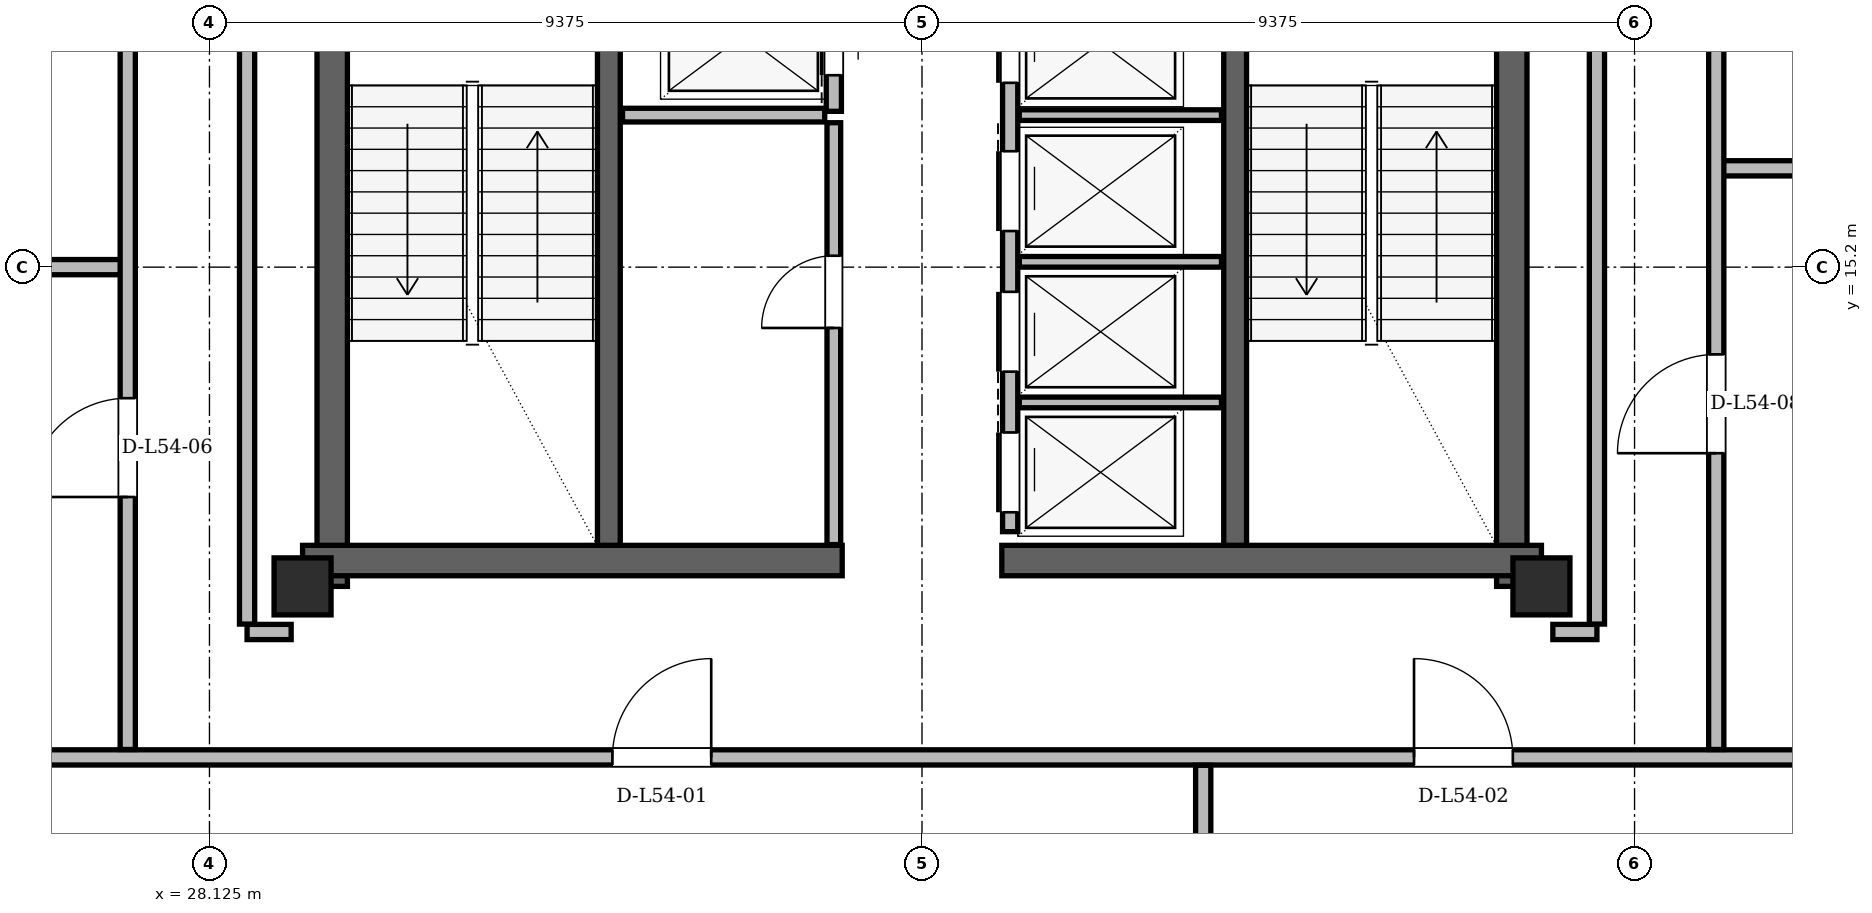
"""IFC4 building model, lengths in metres.
Left out: names, types, materials, properties, quantities, classifications, styles, units other than length and angle.
Written with IfcOpenShell. Run it as: python <this file> out.ifc"""

import sys

from ifc_helpers import new_model, si_unit, direction, frame, frame_2d, origin, origin_2d, place, context, subcontext, project, spatial, rectangle, hollow_rectangle, extrude, element, fill, save


model = new_model("IFC4")
c1 = context("Model", 3, precision=1e-05, world=origin(), true_north=direction((0.0, 1.0)))
c2 = subcontext(c1, "Body", "Model", "MODEL_VIEW")
j1 = project(units=[si_unit("LENGTHUNIT", "METRE"), si_unit("PLANEANGLEUNIT", "RADIAN")], contexts=[c1])
p1 = place(None, origin())
s1 = spatial("IfcSite", under=j1, at=p1, CompositionType="ELEMENT")
p2 = place(p1, origin())
s2 = spatial("IfcBuilding", under=s1, at=p2, CompositionType="ELEMENT")
p3 = place(p2, frame((0.0, 0.0, 204.6)))
s3 = spatial("IfcBuildingStorey", under=s2, at=p3, CompositionType="ELEMENT", Elevation=204.6)
for number, where, z_axis, x_axis in (
    (1, (29.35, 11.0, 0.0), (0.0, 0.0, 1.0), (1.0, 0.0, 0.0)),
    (2, (45.65, 11.0, 0.0), (0.0, 0.0, 1.0), (1.0, 0.0, 0.0)),
):
    element("IfcColumn", number, at=place(p3, frame(where, z_axis=z_axis, x_axis=x_axis)), inside=s3, PredefinedType="COLUMN", context=c2, shape_type="SweptSolid", body=[
        extrude(hollow_rectangle(XDim=0.75, YDim=0.75, WallThickness=0.06, at=origin_2d()), origin(), (0.0, 0.0, 1.0), 4.5),
    ])
for number, where, z_axis, x_axis in (
    (3, (29.74, 11.0, 0.0), (0.0, 0.0, 1.0), (0.0, 1.0, 0.0)),
    (4, (45.26, 11.0, 0.0), (0.0, 0.0, 1.0), (0.0, 1.0, 0.0)),
):
    element("IfcWall", number, at=place(p3, frame(where, z_axis=z_axis, x_axis=x_axis)), inside=s3, PredefinedType="SHEAR", context=c2, shape_type="SweptSolid", body=[
        extrude(rectangle(XDim=13.3, YDim=0.4, at=frame_2d((6.65, 0.0))), origin(), (0.0, 0.0, 1.0), 4.28),
    ])
for number, where, z_axis, x_axis in (
    (5, (29.35, 11.34, 0.0), (0.0, 0.0, 1.0), (1.0, 0.0, 0.0)),
    (6, (38.55, 11.34, 0.0), (0.0, 0.0, 1.0), (1.0, 0.0, 0.0)),
):
    element("IfcWall", number, at=place(p3, frame(where, z_axis=z_axis, x_axis=x_axis)), inside=s3, PredefinedType="SHEAR", context=c2, shape_type="SweptSolid", body=[
        extrude(rectangle(XDim=7.1, YDim=0.4, at=frame_2d((3.55, 0.0))), origin(), (0.0, 0.0, 1.0), 4.28),
    ])
for number, where, z_axis, x_axis in (
    (7, (33.38, 11.54, 0.0), (0.0, 0.0, 1.0), (0.0, 1.0, 0.0)),
    (8, (41.62, 11.54, 0.0), (0.0, 0.0, 1.0), (0.0, 1.0, 0.0)),
):
    element("IfcWall", number, at=place(p3, frame(where, z_axis=z_axis, x_axis=x_axis)), inside=s3, PredefinedType="SHEAR", context=c2, shape_type="SweptSolid", body=[
        extrude(rectangle(XDim=7.62, YDim=0.3, at=frame_2d((3.81, 0.0))), origin(), (0.0, 0.0, 1.0), 4.28),
    ])
p4 = place(p3, frame((36.34, 17.25, 0.0), z_axis=(0.0, 0.0, 1.0), x_axis=(0.0, 1.0, 0.0)))
e9 = element("IfcWall", 9, at=p4, inside=s3, PredefinedType="PARTITIONING", context=c2, shape_type="SweptSolid", body=[
    extrude(rectangle(XDim=2.07, YDim=0.2, at=frame_2d((1.035, 0.0))), origin(), (0.0, 0.0, 1.0), 4.28),
])
p5 = place(p4, frame((0.475, 0.0, 0.0)))
e10 = element("IfcOpeningElement", 10, at=p5, cuts=e9, PredefinedType="OPENING", context=c2, shape_type="SweptSolid", body=[
    extrude(rectangle(XDim=1.05, YDim=2.15, at=frame_2d((0.525, 1.075))), frame((0.0, 0.1, 0.0), z_axis=(0.0, -1.0, 0.0), x_axis=(1.0, 0.0, 0.0)), (0.0, 0.0, 1.0), 0.2),
])
p6 = place(p3, frame((33.56, 17.2, 0.0), z_axis=(0.0, 0.0, 1.0), x_axis=(1.0, 0.0, 0.0)))
e11 = element("IfcWall", 11, at=p6, inside=s3, PredefinedType="PARTITIONING", context=c2, shape_type="SweptSolid", body=[
    extrude(rectangle(XDim=2.66, YDim=0.18, at=frame_2d((1.33, 0.0))), origin(), (0.0, 0.0, 1.0), 4.28),
])
p7 = place(p3, frame((36.34, 11.55, 0.0), z_axis=(0.0, 0.0, 1.0), x_axis=(0.0, 1.0, 0.0)))
e12 = element("IfcWall", 12, at=p7, inside=s3, PredefinedType="PARTITIONING", context=c2, shape_type="SweptSolid", body=[
    extrude(rectangle(XDim=5.55, YDim=0.18, at=frame_2d((2.775, 0.0))), origin(), (0.0, 0.0, 1.0), 4.28),
])
p8 = place(p7, frame((2.85, 0.0, 0.0)))
e13 = element("IfcOpeningElement", 13, at=p8, cuts=e12, PredefinedType="OPENING", context=c2, shape_type="SweptSolid", body=[
    extrude(rectangle(XDim=0.95, YDim=2.1, at=frame_2d((0.475, 1.05))), frame((0.0, 0.09, 0.0), z_axis=(0.0, -1.0, 0.0), x_axis=(1.0, 0.0, 0.0)), (0.0, 0.0, 1.0), 0.18),
])
p9 = place(p3, frame((38.66, 11.72, 0.0), z_axis=(0.0, 0.0, 1.0), x_axis=(0.0, 1.0, 0.0)))
e14 = element("IfcWall", 14, at=p9, inside=s3, PredefinedType="PARTITIONING", context=c2, shape_type="SweptSolid", body=[
    extrude(rectangle(XDim=9.1, YDim=0.2, at=frame_2d((4.55, 0.0))), origin(), (0.0, 0.0, 1.0), 4.28),
])
p10 = place(p9, frame((0.255, 0.0, 0.0)))
e15 = element("IfcOpeningElement", 15, at=p10, cuts=e14, PredefinedType="OPENING", context=c2, shape_type="SweptSolid", body=[
    extrude(rectangle(XDim=1.05, YDim=2.15, at=frame_2d((0.525, 1.075))), frame((0.0, 0.1, 0.0), z_axis=(0.0, -1.0, 0.0), x_axis=(1.0, 0.0, 0.0)), (0.0, 0.0, 1.0), 0.2),
])
p11 = place(p9, frame((2.105, 0.0, 0.0)))
e16 = element("IfcOpeningElement", 16, at=p11, cuts=e14, PredefinedType="OPENING", context=c2, shape_type="SweptSolid", body=[
    extrude(rectangle(XDim=1.05, YDim=2.15, at=frame_2d((0.525, 1.075))), frame((0.0, 0.1, 0.0), z_axis=(0.0, -1.0, 0.0), x_axis=(1.0, 0.0, 0.0)), (0.0, 0.0, 1.0), 0.2),
])
p12 = place(p9, frame((3.955, 0.0, 0.0)))
e17 = element("IfcOpeningElement", 17, at=p12, cuts=e14, PredefinedType="OPENING", context=c2, shape_type="SweptSolid", body=[
    extrude(rectangle(XDim=1.05, YDim=2.15, at=frame_2d((0.525, 1.075))), frame((0.0, 0.1, 0.0), z_axis=(0.0, -1.0, 0.0), x_axis=(1.0, 0.0, 0.0)), (0.0, 0.0, 1.0), 0.2),
])
p13 = place(p9, frame((5.905, 0.0, 0.0)))
e18 = element("IfcOpeningElement", 18, at=p13, cuts=e14, PredefinedType="OPENING", context=c2, shape_type="SweptSolid", body=[
    extrude(rectangle(XDim=1.05, YDim=2.15, at=frame_2d((0.525, 1.075))), frame((0.0, 0.1, 0.0), z_axis=(0.0, -1.0, 0.0), x_axis=(1.0, 0.0, 0.0)), (0.0, 0.0, 1.0), 0.2),
])
p14 = place(p9, frame((7.705, 0.0, 0.0)))
e19 = element("IfcOpeningElement", 19, at=p14, cuts=e14, PredefinedType="OPENING", context=c2, shape_type="SweptSolid", body=[
    extrude(rectangle(XDim=1.05, YDim=2.15, at=frame_2d((0.525, 1.075))), frame((0.0, 0.1, 0.0), z_axis=(0.0, -1.0, 0.0), x_axis=(1.0, 0.0, 0.0)), (0.0, 0.0, 1.0), 0.2),
])
for number, where, z_axis, x_axis in (
    (20, (38.78, 13.42, 0.0), (0.0, 0.0, 1.0), (1.0, 0.0, 0.0)),
    (21, (38.78, 15.27, 0.0), (0.0, 0.0, 1.0), (1.0, 0.0, 0.0)),
    (22, (38.78, 17.2, 0.0), (0.0, 0.0, 1.0), (1.0, 0.0, 0.0)),
):
    element("IfcWall", number, at=place(p3, frame(where, z_axis=z_axis, x_axis=x_axis)), inside=s3, PredefinedType="PARTITIONING", context=c2, shape_type="SweptSolid", body=[
        extrude(rectangle(XDim=2.66, YDim=0.14, at=frame_2d((1.33, 0.0))), origin(), (0.0, 0.0, 1.0), 4.28),
    ])
p15 = place(p3, frame((17.562, 8.75, 0.0), z_axis=(0.0, 0.0, 1.0), x_axis=(1.0, 0.0, 0.0)))
e23 = element("IfcWall", 23, at=p15, inside=s3, PredefinedType="PARTITIONING", context=c2, shape_type="SweptSolid", body=[
    extrude(rectangle(XDim=39.877, YDim=0.2, at=frame_2d((19.938, 0.0))), origin(), (0.0, 0.0, 1.0), 3.813),
])
p16 = place(p15, frame((15.865, 0.0, 0.0)))
e24 = element("IfcOpeningElement", 24, at=p16, cuts=e23, PredefinedType="OPENING", context=c2, shape_type="SweptSolid", body=[
    extrude(rectangle(XDim=1.3, YDim=2.2, at=frame_2d((0.65, 1.1))), frame((0.0, 0.1, 0.0), z_axis=(0.0, -1.0, 0.0), x_axis=(1.0, 0.0, 0.0)), (0.0, 0.0, 1.0), 0.2),
])
p17 = place(p15, frame((26.412, 0.0, 0.0)))
e25 = element("IfcOpeningElement", 25, at=p17, cuts=e23, PredefinedType="OPENING", context=c2, shape_type="SweptSolid", body=[
    extrude(rectangle(XDim=1.3, YDim=2.2, at=frame_2d((0.65, 1.1))), frame((0.0, 0.1, 0.0), z_axis=(0.0, -1.0, 0.0), x_axis=(1.0, 0.0, 0.0)), (0.0, 0.0, 1.0), 0.2),
])
for number, where, z_axis, x_axis in (
    (26, (28.62, 10.4, 0.0), (0.0, 0.0, 1.0), (1.0, 0.0, 0.0)),
    (27, (45.8, 10.4, 0.0), (0.0, 0.0, 1.0), (1.0, 0.0, 0.0)),
):
    element("IfcWall", number, at=place(p3, frame(where, z_axis=z_axis, x_axis=x_axis)), inside=s3, PredefinedType="PARTITIONING", context=c2, shape_type="SweptSolid", body=[
        extrude(rectangle(XDim=0.58, YDim=0.2, at=frame_2d((0.29, 0.0))), origin(), (0.0, 0.0, 1.0), 4.28),
    ])
p18 = place(p3, frame((17.926, 15.2, 0.0), z_axis=(0.0, 0.0, 1.0), x_axis=(1.0, 0.0, 0.0)))
e28 = element("IfcWall", 28, at=p18, inside=s3, PredefinedType="PARTITIONING", context=c2, shape_type="SweptSolid", body=[
    extrude(rectangle(XDim=9.124, YDim=0.2, at=frame_2d((4.562, 0.0))), origin(), (0.0, 0.0, 1.0), 4.28),
])
p19 = place(p3, frame((47.95, 16.5, 0.0), z_axis=(0.0, 0.0, 1.0), x_axis=(1.0, 0.0, 0.0)))
e29 = element("IfcWall", 29, at=p19, inside=s3, PredefinedType="PARTITIONING", context=c2, shape_type="SweptSolid", body=[
    extrude(rectangle(XDim=8.195, YDim=0.2, at=frame_2d((4.098, 0.0))), origin(), (0.0, 0.0, 1.0), 4.28),
])
p20 = place(p3, frame((27.05, 8.854, 0.0), z_axis=(0.0, 0.0, 1.0), x_axis=(0.0, 1.0, 0.0)))
e30 = element("IfcWall", 30, at=p20, inside=s3, PredefinedType="PARTITIONING", context=c2, shape_type="SweptSolid", body=[
    extrude(rectangle(XDim=22.218, YDim=0.2, at=frame_2d((11.109, 0.0))), origin(), (0.0, 0.0, 1.0), 3.577),
])
p21 = place(p20, frame((3.322, 0.0, 0.0)))
e31 = element("IfcOpeningElement", 31, at=p21, cuts=e30, PredefinedType="OPENING", context=c2, shape_type="SweptSolid", body=[
    extrude(rectangle(XDim=1.3, YDim=2.2, at=frame_2d((0.65, 1.1))), frame((0.0, 0.1, 0.0), z_axis=(0.0, -1.0, 0.0), x_axis=(1.0, 0.0, 0.0)), (0.0, 0.0, 1.0), 0.2),
])
p22 = place(p20, frame((10.445, 0.0, 0.0)))
e32 = element("IfcOpeningElement", 32, at=p22, cuts=e30, PredefinedType="OPENING", context=c2, shape_type="SweptSolid", body=[
    extrude(rectangle(XDim=1.3, YDim=2.2, at=frame_2d((0.65, 1.1))), frame((0.0, 0.1, 0.0), z_axis=(0.0, -1.0, 0.0), x_axis=(1.0, 0.0, 0.0)), (0.0, 0.0, 1.0), 0.2),
])
p23 = place(p3, frame((28.62, 10.504, 0.0), z_axis=(0.0, 0.0, 1.0), x_axis=(0.0, 1.0, 0.0)))
e33 = element("IfcWall", 33, at=p23, inside=s3, PredefinedType="PARTITIONING", context=c2, shape_type="SweptSolid", body=[
    extrude(rectangle(XDim=14.142, YDim=0.2, at=frame_2d((7.071, 0.0))), origin(), (0.0, 0.0, 1.0), 3.813),
])
p24 = place(p3, frame((41.2, 5.598, 0.0), z_axis=(0.0, 0.0, 1.0), x_axis=(0.0, 1.0, 0.0)))
e34 = element("IfcWall", 34, at=p24, inside=s3, PredefinedType="PARTITIONING", context=c2, shape_type="SweptSolid", body=[
    extrude(rectangle(XDim=3.048, YDim=0.2, at=frame_2d((1.524, 0.0))), origin(), (0.0, 0.0, 1.0), 4.28),
])
p25 = place(p3, frame((46.38, 10.504, 0.0), z_axis=(0.0, 0.0, 1.0), x_axis=(0.0, 1.0, 0.0)))
e35 = element("IfcWall", 35, at=p25, inside=s3, PredefinedType="PARTITIONING", context=c2, shape_type="SweptSolid", body=[
    extrude(rectangle(XDim=14.142, YDim=0.2, at=frame_2d((7.071, 0.0))), origin(), (0.0, 0.0, 1.0), 3.813),
])
p26 = place(p3, frame((47.95, 8.854, 0.0), z_axis=(0.0, 0.0, 1.0), x_axis=(0.0, 1.0, 0.0)))
e36 = element("IfcWall", 36, at=p26, inside=s3, PredefinedType="PARTITIONING", context=c2, shape_type="SweptSolid", body=[
    extrude(rectangle(XDim=21.31, YDim=0.2, at=frame_2d((10.655, 0.0))), origin(), (0.0, 0.0, 1.0), 3.813),
])
p27 = place(p26, frame((3.898, 0.0, 0.0)))
e37 = element("IfcOpeningElement", 37, at=p27, cuts=e36, PredefinedType="OPENING", context=c2, shape_type="SweptSolid", body=[
    extrude(rectangle(XDim=1.3, YDim=2.2, at=frame_2d((0.65, 1.1))), frame((0.0, 0.1, 0.0), z_axis=(0.0, -1.0, 0.0), x_axis=(1.0, 0.0, 0.0)), (0.0, 0.0, 1.0), 0.2),
])
p28 = place(p26, frame((11.02, 0.0, 0.0)))
e38 = element("IfcOpeningElement", 38, at=p28, cuts=e36, PredefinedType="OPENING", context=c2, shape_type="SweptSolid", body=[
    extrude(rectangle(XDim=1.3, YDim=2.2, at=frame_2d((0.65, 1.1))), frame((0.0, 0.1, 0.0), z_axis=(0.0, -1.0, 0.0), x_axis=(1.0, 0.0, 0.0)), (0.0, 0.0, 1.0), 0.2),
])
p29 = place(p8, origin())
e39 = element("IfcDoor", 39, at=p29, inside=s3, OperationType="SINGLE_SWING_LEFT", PredefinedType="DOOR", context=c2, shape_type="SweptSolid", body=[
    extrude(rectangle(XDim=0.95, YDim=2.1, at=frame_2d((0.475, 1.05))), frame((0.0, 0.025, 0.0), z_axis=(0.0, -1.0, 0.0), x_axis=(1.0, 0.0, 0.0)), (0.0, 0.0, 1.0), 0.05),
])
fill(e13, e39)
p30 = place(p10, origin())
e40 = element("IfcDoor", 40, at=p30, inside=s3, OperationType="SLIDING_TO_RIGHT", PredefinedType="DOOR", context=c2, shape_type="SweptSolid", body=[
    extrude(rectangle(XDim=1.05, YDim=2.15, at=frame_2d((0.525, 1.075))), frame((0.0, 0.025, 0.0), z_axis=(0.0, -1.0, 0.0), x_axis=(1.0, 0.0, 0.0)), (0.0, 0.0, 1.0), 0.05),
])
fill(e15, e40)
p31 = place(p11, origin())
e41 = element("IfcDoor", 41, at=p31, inside=s3, OperationType="SLIDING_TO_LEFT", PredefinedType="DOOR", context=c2, shape_type="SweptSolid", body=[
    extrude(rectangle(XDim=1.05, YDim=2.15, at=frame_2d((0.525, 1.075))), frame((0.0, 0.025, 0.0), z_axis=(0.0, -1.0, 0.0), x_axis=(1.0, 0.0, 0.0)), (0.0, 0.0, 1.0), 0.05),
])
fill(e16, e41)
p32 = place(p12, origin())
e42 = element("IfcDoor", 42, at=p32, inside=s3, OperationType="SLIDING_TO_RIGHT", PredefinedType="DOOR", context=c2, shape_type="SweptSolid", body=[
    extrude(rectangle(XDim=1.05, YDim=2.15, at=frame_2d((0.525, 1.075))), frame((0.0, 0.025, 0.0), z_axis=(0.0, -1.0, 0.0), x_axis=(1.0, 0.0, 0.0)), (0.0, 0.0, 1.0), 0.05),
])
fill(e17, e42)
p33 = place(p5, origin())
e43 = element("IfcDoor", 43, at=p33, inside=s3, OperationType="SLIDING_TO_LEFT", PredefinedType="DOOR", context=c2, shape_type="SweptSolid", body=[
    extrude(rectangle(XDim=1.05, YDim=2.15, at=frame_2d((0.525, 1.075))), frame((0.0, 0.025, 0.0), z_axis=(0.0, -1.0, 0.0), x_axis=(1.0, 0.0, 0.0)), (0.0, 0.0, 1.0), 0.05),
])
fill(e10, e43)
p34 = place(p13, origin())
e44 = element("IfcDoor", 44, at=p34, inside=s3, OperationType="SLIDING_TO_RIGHT", PredefinedType="DOOR", context=c2, shape_type="SweptSolid", body=[
    extrude(rectangle(XDim=1.05, YDim=2.15, at=frame_2d((0.525, 1.075))), frame((0.0, 0.025, 0.0), z_axis=(0.0, -1.0, 0.0), x_axis=(1.0, 0.0, 0.0)), (0.0, 0.0, 1.0), 0.05),
])
fill(e18, e44)
p35 = place(p16, origin())
e45 = element("IfcDoor", 45, at=p35, inside=s3, OperationType="SINGLE_SWING_RIGHT", PredefinedType="DOOR", context=c2, shape_type="SweptSolid", body=[
    extrude(rectangle(XDim=1.3, YDim=2.2, at=frame_2d((0.65, 1.1))), frame((0.0, 0.025, 0.0), z_axis=(0.0, -1.0, 0.0), x_axis=(1.0, 0.0, 0.0)), (0.0, 0.0, 1.0), 0.05),
])
fill(e24, e45)
p36 = place(p17, origin())
e46 = element("IfcDoor", 46, at=p36, inside=s3, OperationType="SINGLE_SWING_LEFT", PredefinedType="DOOR", context=c2, shape_type="SweptSolid", body=[
    extrude(rectangle(XDim=1.3, YDim=2.2, at=frame_2d((0.65, 1.1))), frame((0.0, 0.025, 0.0), z_axis=(0.0, -1.0, 0.0), x_axis=(1.0, 0.0, 0.0)), (0.0, 0.0, 1.0), 0.05),
])
fill(e25, e46)
p37 = place(p21, origin())
e47 = element("IfcDoor", 47, at=p37, inside=s3, OperationType="SINGLE_SWING_LEFT", PredefinedType="DOOR", context=c2, shape_type="SweptSolid", body=[
    extrude(rectangle(XDim=1.3, YDim=2.2, at=frame_2d((0.65, 1.1))), frame((0.0, 0.025, 0.0), z_axis=(0.0, -1.0, 0.0), x_axis=(1.0, 0.0, 0.0)), (0.0, 0.0, 1.0), 0.05),
])
fill(e31, e47)
p38 = place(p27, origin())
e48 = element("IfcDoor", 48, at=p38, inside=s3, OperationType="SINGLE_SWING_LEFT", PredefinedType="DOOR", context=c2, shape_type="SweptSolid", body=[
    extrude(rectangle(XDim=1.3, YDim=2.2, at=frame_2d((0.65, 1.1))), frame((0.0, 0.025, 0.0), z_axis=(0.0, -1.0, 0.0), x_axis=(1.0, 0.0, 0.0)), (0.0, 0.0, 1.0), 0.05),
])
fill(e37, e48)
save(model, sys.argv[1])
